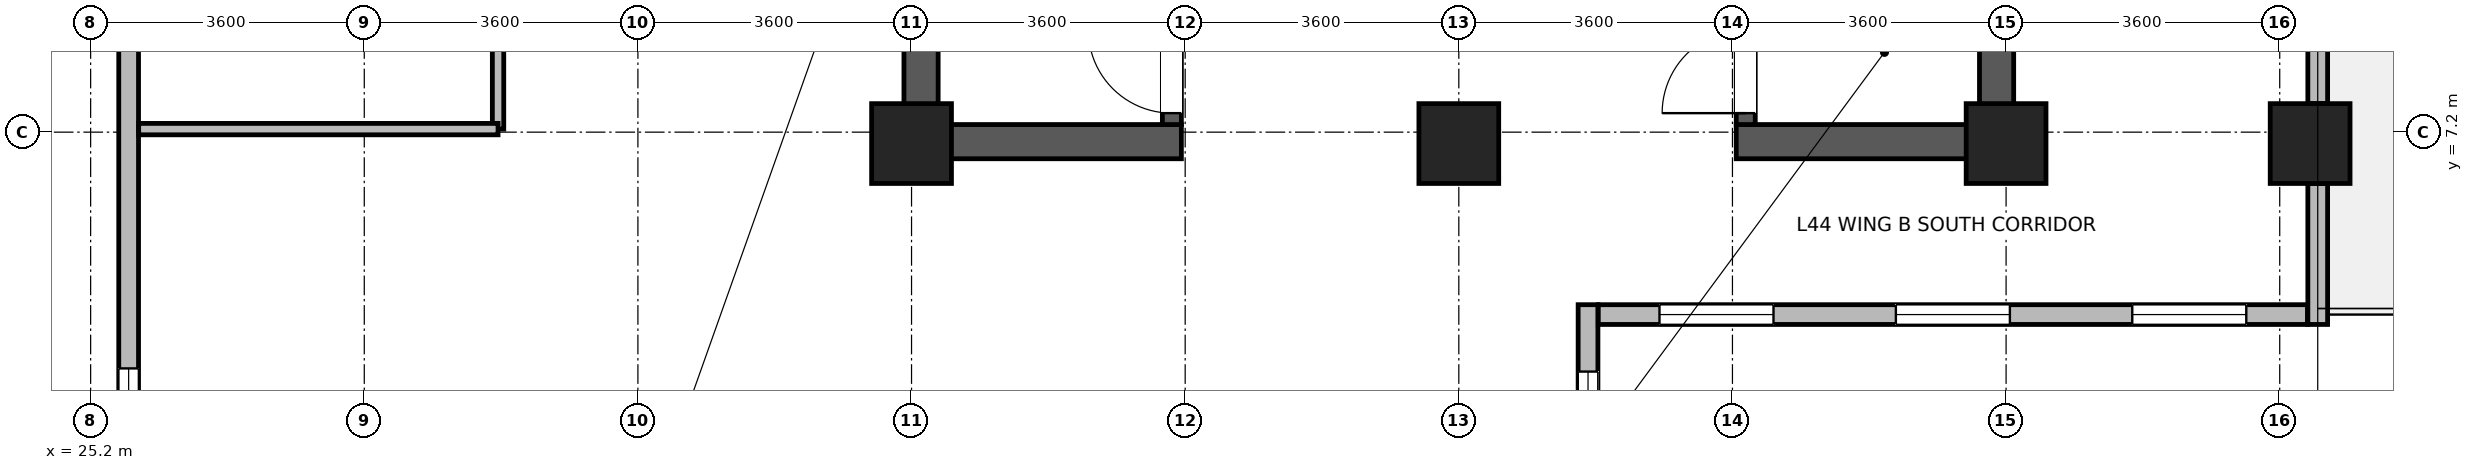
"""IFC4 building model, lengths in metres.
Left out: names, types, materials, properties, quantities, classifications, styles, units other than length and angle.
Written with IfcOpenShell. Run it as: python <this file> out.ifc"""

import sys

from ifc_helpers import new_model, si_unit, direction, frame, frame_2d, origin, origin_2d, place, context, subcontext, project, spatial, rectangle, extrude, source, transform, mapped, element, fill, save


model = new_model("IFC4")
c1 = context("Model", 3, precision=1e-05, world=origin(), true_north=direction((0.0, 1.0)))
c2 = subcontext(c1, "Body", "Model", "MODEL_VIEW")
j1 = project(units=[si_unit("LENGTHUNIT", "METRE"), si_unit("PLANEANGLEUNIT", "RADIAN")], contexts=[c1])
p1 = place(None, origin())
s1 = spatial("IfcSite", under=j1, at=p1, CompositionType="ELEMENT")
p2 = place(p1, origin())
s2 = spatial("IfcBuilding", under=s1, at=p2, CompositionType="ELEMENT")
p3 = place(p2, frame((0.0, 0.0, 173.5)))
s3 = spatial("IfcBuildingStorey", under=s2, at=p3, CompositionType="ELEMENT", Elevation=173.5)
for number, where, z_axis, x_axis in (
    (1, (36.125, 6.85, 0.0), (0.0, 0.0, 1.0), (0.0, 1.0, 0.0)),
    (2, (50.275, 6.85, 0.0), (0.0, 0.0, 1.0), (0.0, 1.0, 0.0)),
):
    element("IfcWall", number, at=place(p3, frame(where, z_axis=z_axis, x_axis=x_axis)), inside=s3, PredefinedType="SHEAR", context=c2, shape_type="SweptSolid", body=[
        extrude(rectangle(XDim=7.9, YDim=0.45, at=frame_2d((3.95, 0.0))), origin(), (0.0, 0.0, 1.0), 3.46),
    ])
for number, where, z_axis, x_axis in (
    (3, (36.35, 7.075, 0.0), (0.0, 0.0, 1.0), (1.0, 0.0, 0.0)),
    (4, (46.85, 7.075, 0.0), (0.0, 0.0, 1.0), (1.0, 0.0, 0.0)),
):
    element("IfcWall", number, at=place(p3, frame(where, z_axis=z_axis, x_axis=x_axis)), inside=s3, PredefinedType="SHEAR", context=c2, shape_type="SweptSolid", body=[
        extrude(rectangle(XDim=3.2, YDim=0.45, at=frame_2d((1.6, 0.0))), origin(), (0.0, 0.0, 1.0), 3.46),
    ])
p4 = place(p3, frame((39.425, 7.3, 0.0), z_axis=(0.0, 0.0, 1.0), x_axis=(0.0, 1.0, 0.0)))
e5 = element("IfcWall", 5, at=p4, inside=s3, PredefinedType="SHEAR", context=c2, shape_type="SweptSolid", body=[
    extrude(rectangle(XDim=7.0, YDim=0.25, at=frame_2d((3.5, 0.0))), origin(), (0.0, 0.0, 1.0), 3.46),
])
p5 = place(p4, frame((0.15, 0.0, 0.0)))
e6 = element("IfcOpeningElement", 6, at=p5, cuts=e5, PredefinedType="OPENING", context=c2, shape_type="SweptSolid", body=[
    extrude(rectangle(XDim=1.1, YDim=2.08, at=frame_2d((0.55, 1.04))), frame((0.0, 0.135, 0.0), z_axis=(0.0, -1.0, 0.0), x_axis=(1.0, 0.0, 0.0)), (0.0, 0.0, 1.0), 0.27),
])
p6 = place(p3, frame((46.975, 7.3, 0.0), z_axis=(0.0, 0.0, 1.0), x_axis=(0.0, 1.0, 0.0)))
e7 = element("IfcWall", 7, at=p6, inside=s3, PredefinedType="SHEAR", context=c2, shape_type="SweptSolid", body=[
    extrude(rectangle(XDim=7.0, YDim=0.25, at=frame_2d((3.5, 0.0))), origin(), (0.0, 0.0, 1.0), 3.46),
])
p7 = place(p6, frame((0.15, 0.0, 0.0)))
e8 = element("IfcOpeningElement", 8, at=p7, cuts=e7, PredefinedType="OPENING", context=c2, shape_type="SweptSolid", body=[
    extrude(rectangle(XDim=1.1, YDim=2.08, at=frame_2d((0.55, 1.04))), frame((0.0, 0.135, 0.0), z_axis=(0.0, -1.0, 0.0), x_axis=(1.0, 0.0, 0.0)), (0.0, 0.0, 1.0), 0.27),
])
m1 = source(origin(), c2, "Body", "SweptSolid", [
    extrude(rectangle(XDim=1.05, YDim=1.05, at=origin_2d()), origin(), (0.0, 0.0, 1.0), 3.7),
])
for number, where, z_axis, x_axis in (
    (9, (36.0, 7.05, 0.0), (0.0, 0.0, 1.0), (1.0, 0.0, 0.0)),
    (10, (43.2, 7.05, 0.0), (0.0, 0.0, 1.0), (1.0, 0.0, 0.0)),
    (11, (50.4, 7.05, 0.0), (0.0, 0.0, 1.0), (1.0, 0.0, 0.0)),
    (12, (54.4, 7.05, 0.0), (0.0, 0.0, 1.0), (1.0, 0.0, 0.0)),
):
    element("IfcColumn", number, at=place(p3, frame(where, z_axis=z_axis, x_axis=x_axis)), inside=s3, PredefinedType="COLUMN", context=c2, shape_type="MappedRepresentation", body=[
        mapped(m1, transform((0.0, 0.0, 0.0), x_axis=(1.0, 0.0, 0.0), y_axis=(0.0, 1.0, 0.0), z_axis=(0.0, 0.0, 1.0), scale=1.0)),
    ])
p8 = place(p3, frame((44.9, 4.93, 0.0), z_axis=(0.0, 0.0, 1.0), x_axis=(0.0, -1.0, 0.0)))
e13 = element("IfcWall", 13, at=p8, inside=s3, PredefinedType="STANDARD", context=c2, shape_type="SweptSolid", body=[
    extrude(rectangle(XDim=3.26, YDim=0.26, at=frame_2d((1.63, 0.0))), origin(), (0.0, 0.0, 1.0), 3.44),
])
p9 = place(p8, frame((0.88, 0.0, 0.85)))
e14 = element("IfcOpeningElement", 14, at=p9, cuts=e13, PredefinedType="OPENING", context=c2, shape_type="SweptSolid", body=[
    extrude(rectangle(XDim=1.5, YDim=1.85, at=frame_2d((0.75, 0.925))), frame((0.0, 0.14, 0.0), z_axis=(0.0, -1.0, 0.0), x_axis=(1.0, 0.0, 0.0)), (0.0, 0.0, 1.0), 0.28),
])
p10 = place(p3, frame((54.365, 4.8, 0.0), z_axis=(0.0, 0.0, 1.0), x_axis=(-1.0, 0.0, 0.0)))
e15 = element("IfcWall", 15, at=p10, inside=s3, PredefinedType="STANDARD", context=c2, shape_type="SweptSolid", body=[
    extrude(rectangle(XDim=9.33, YDim=0.26, at=frame_2d((4.665, 0.0))), origin(), (0.0, 0.0, 1.0), 3.44),
])
p11 = place(p10, frame((0.805, 0.0, 0.85)))
e16 = element("IfcOpeningElement", 16, at=p11, cuts=e15, PredefinedType="OPENING", context=c2, shape_type="SweptSolid", body=[
    extrude(rectangle(XDim=1.5, YDim=1.85, at=frame_2d((0.75, 0.925))), frame((0.0, 0.14, 0.0), z_axis=(0.0, -1.0, 0.0), x_axis=(1.0, 0.0, 0.0)), (0.0, 0.0, 1.0), 0.28),
])
p12 = place(p10, frame((3.915, 0.0, 0.85)))
e17 = element("IfcOpeningElement", 17, at=p12, cuts=e15, PredefinedType="OPENING", context=c2, shape_type="SweptSolid", body=[
    extrude(rectangle(XDim=1.5, YDim=1.85, at=frame_2d((0.75, 0.925))), frame((0.0, 0.14, 0.0), z_axis=(0.0, -1.0, 0.0), x_axis=(1.0, 0.0, 0.0)), (0.0, 0.0, 1.0), 0.28),
])
p13 = place(p10, frame((7.025, 0.0, 0.85)))
e18 = element("IfcOpeningElement", 18, at=p13, cuts=e15, PredefinedType="OPENING", context=c2, shape_type="SweptSolid", body=[
    extrude(rectangle(XDim=1.5, YDim=1.85, at=frame_2d((0.75, 0.925))), frame((0.0, 0.14, 0.0), z_axis=(0.0, -1.0, 0.0), x_axis=(1.0, 0.0, 0.0)), (0.0, 0.0, 1.0), 0.28),
])
p14 = place(p3, frame((54.5, 6.524, 0.0), z_axis=(0.0, 0.0, 1.0), x_axis=(0.0, -1.0, 0.0)))
e19 = element("IfcWall", 19, at=p14, inside=s3, PredefinedType="STANDARD", context=c2, shape_type="SweptSolid", body=[
    extrude(rectangle(XDim=1.854, YDim=0.26, at=frame_2d((0.927, 0.0))), origin(), (0.0, 0.0, 1.0), 3.44),
])
p15 = place(p3, frame((54.5, 14.024, 0.0), z_axis=(0.0, 0.0, 1.0), x_axis=(0.0, -1.0, 0.0)))
e20 = element("IfcWall", 20, at=p15, inside=s3, PredefinedType="STANDARD", context=c2, shape_type="SweptSolid", body=[
    extrude(rectangle(XDim=6.448, YDim=0.26, at=frame_2d((3.224, 0.0))), origin(), (0.0, 0.0, 1.0), 2.99),
])
p16 = place(p15, frame((4.086, 0.0, 0.85)))
e21 = element("IfcOpeningElement", 21, at=p16, cuts=e20, PredefinedType="OPENING", context=c2, shape_type="SweptSolid", body=[
    extrude(rectangle(XDim=1.5, YDim=1.85, at=frame_2d((0.75, 0.925))), frame((0.0, 0.14, 0.0), z_axis=(0.0, -1.0, 0.0), x_axis=(1.0, 0.0, 0.0)), (0.0, 0.0, 1.0), 0.28),
])
p17 = place(p15, frame((2.749, 0.0, 0.85)))
e22 = element("IfcOpeningElement", 22, at=p17, cuts=e20, PredefinedType="OPENING", context=c2, shape_type="SweptSolid", body=[
    extrude(rectangle(XDim=0.95, YDim=1.75, at=frame_2d((0.475, 0.875))), frame((0.0, 0.14, 0.0), z_axis=(0.0, -1.0, 0.0), x_axis=(1.0, 0.0, 0.0)), (0.0, 0.0, 1.0), 0.28),
])
p18 = place(p3, frame((25.7, 1.67, 0.0), z_axis=(0.0, 0.0, 1.0), x_axis=(0.0, 1.0, 0.0)))
e23 = element("IfcWall", 23, at=p18, inside=s3, PredefinedType="STANDARD", context=c2, shape_type="SweptSolid", body=[
    extrude(rectangle(XDim=20.06, YDim=0.26, at=frame_2d((10.03, 0.0))), origin(), (0.0, 0.0, 1.0), 3.44),
])
p19 = place(p18, frame((0.922, 0.0, 0.85)))
e24 = element("IfcOpeningElement", 24, at=p19, cuts=e23, PredefinedType="OPENING", context=c2, shape_type="SweptSolid", body=[
    extrude(rectangle(XDim=1.5, YDim=1.85, at=frame_2d((0.75, 0.925))), frame((0.0, 0.14, 0.0), z_axis=(0.0, -1.0, 0.0), x_axis=(1.0, 0.0, 0.0)), (0.0, 0.0, 1.0), 0.28),
])
p20 = place(p18, frame((7.608, 0.0, 0.85)))
e25 = element("IfcOpeningElement", 25, at=p20, cuts=e23, PredefinedType="OPENING", context=c2, shape_type="SweptSolid", body=[
    extrude(rectangle(XDim=1.5, YDim=1.85, at=frame_2d((0.75, 0.925))), frame((0.0, 0.14, 0.0), z_axis=(0.0, -1.0, 0.0), x_axis=(1.0, 0.0, 0.0)), (0.0, 0.0, 1.0), 0.28),
])
p21 = place(p18, frame((10.952, 0.0, 0.85)))
e26 = element("IfcOpeningElement", 26, at=p21, cuts=e23, PredefinedType="OPENING", context=c2, shape_type="SweptSolid", body=[
    extrude(rectangle(XDim=1.5, YDim=1.85, at=frame_2d((0.75, 0.925))), frame((0.0, 0.14, 0.0), z_axis=(0.0, -1.0, 0.0), x_axis=(1.0, 0.0, 0.0)), (0.0, 0.0, 1.0), 0.28),
])
p22 = place(p18, frame((14.295, 0.0, 0.85)))
e27 = element("IfcOpeningElement", 27, at=p22, cuts=e23, PredefinedType="OPENING", context=c2, shape_type="SweptSolid", body=[
    extrude(rectangle(XDim=1.5, YDim=1.85, at=frame_2d((0.75, 0.925))), frame((0.0, 0.14, 0.0), z_axis=(0.0, -1.0, 0.0), x_axis=(1.0, 0.0, 0.0)), (0.0, 0.0, 1.0), 0.28),
])
p23 = place(p18, frame((17.638, 0.0, 0.85)))
e28 = element("IfcOpeningElement", 28, at=p23, cuts=e23, PredefinedType="OPENING", context=c2, shape_type="SweptSolid", body=[
    extrude(rectangle(XDim=1.5, YDim=1.85, at=frame_2d((0.75, 0.925))), frame((0.0, 0.14, 0.0), z_axis=(0.0, -1.0, 0.0), x_axis=(1.0, 0.0, 0.0)), (0.0, 0.0, 1.0), 0.28),
])
p24 = place(p3, frame((30.56, 7.24, 0.0), z_axis=(0.0, 0.0, 1.0), x_axis=(0.0, 1.0, 0.0)))
e29 = element("IfcWall", 29, at=p24, inside=s3, PredefinedType="PARTITIONING", context=c2, shape_type="SweptSolid", body=[
    extrude(rectangle(XDim=7.26, YDim=0.15, at=frame_2d((3.63, 0.0))), origin(), (0.0, 0.0, 1.0), 3.44),
])
p25 = place(p24, frame((2.98, 0.0, 0.0)))
e30 = element("IfcOpeningElement", 30, at=p25, cuts=e29, PredefinedType="OPENING", context=c2, shape_type="SweptSolid", body=[
    extrude(rectangle(XDim=1.3, YDim=2.12, at=frame_2d((0.65, 1.06))), frame((0.0, 0.085, 0.0), z_axis=(0.0, -1.0, 0.0), x_axis=(1.0, 0.0, 0.0)), (0.0, 0.0, 1.0), 0.17),
])
p26 = place(p3, frame((25.832, 7.24, 0.0), z_axis=(0.0, 0.0, 1.0), x_axis=(1.0, 0.0, 0.0)))
e31 = element("IfcWall", 31, at=p26, inside=s3, PredefinedType="PARTITIONING", context=c2, shape_type="SweptSolid", body=[
    extrude(rectangle(XDim=4.728, YDim=0.15, at=frame_2d((2.364, 0.0))), origin(), (0.0, 0.0, 1.0), 3.44),
])
p27 = place(p9, origin())
e32 = element("IfcWindow", 32, at=p27, inside=s3, PartitioningType="SINGLE_PANEL", PredefinedType="WINDOW", context=c2, shape_type="SweptSolid", body=[
    extrude(rectangle(XDim=1.5, YDim=1.85, at=frame_2d((0.75, 0.925))), frame((0.0, 0.03, 0.0), z_axis=(0.0, -1.0, 0.0), x_axis=(1.0, 0.0, 0.0)), (0.0, 0.0, 1.0), 0.06),
])
fill(e14, e32)
p28 = place(p11, origin())
e33 = element("IfcWindow", 33, at=p28, inside=s3, PartitioningType="SINGLE_PANEL", PredefinedType="WINDOW", context=c2, shape_type="SweptSolid", body=[
    extrude(rectangle(XDim=1.5, YDim=1.85, at=frame_2d((0.75, 0.925))), frame((0.0, 0.03, 0.0), z_axis=(0.0, -1.0, 0.0), x_axis=(1.0, 0.0, 0.0)), (0.0, 0.0, 1.0), 0.06),
])
fill(e16, e33)
p29 = place(p12, origin())
e34 = element("IfcWindow", 34, at=p29, inside=s3, PartitioningType="SINGLE_PANEL", PredefinedType="WINDOW", context=c2, shape_type="SweptSolid", body=[
    extrude(rectangle(XDim=1.5, YDim=1.85, at=frame_2d((0.75, 0.925))), frame((0.0, 0.03, 0.0), z_axis=(0.0, -1.0, 0.0), x_axis=(1.0, 0.0, 0.0)), (0.0, 0.0, 1.0), 0.06),
])
fill(e17, e34)
p30 = place(p13, origin())
e35 = element("IfcWindow", 35, at=p30, inside=s3, PartitioningType="SINGLE_PANEL", PredefinedType="WINDOW", context=c2, shape_type="SweptSolid", body=[
    extrude(rectangle(XDim=1.5, YDim=1.85, at=frame_2d((0.75, 0.925))), frame((0.0, 0.03, 0.0), z_axis=(0.0, -1.0, 0.0), x_axis=(1.0, 0.0, 0.0)), (0.0, 0.0, 1.0), 0.06),
])
fill(e18, e35)
p31 = place(p19, origin())
e36 = element("IfcWindow", 36, at=p31, inside=s3, PartitioningType="SINGLE_PANEL", PredefinedType="WINDOW", context=c2, shape_type="SweptSolid", body=[
    extrude(rectangle(XDim=1.5, YDim=1.85, at=frame_2d((0.75, 0.925))), frame((0.0, 0.03, 0.0), z_axis=(0.0, -1.0, 0.0), x_axis=(1.0, 0.0, 0.0)), (0.0, 0.0, 1.0), 0.06),
])
fill(e24, e36)
p32 = place(p5, origin())
e37 = element("IfcDoor", 37, at=p32, inside=s3, OperationType="SINGLE_SWING_RIGHT", PredefinedType="DOOR", context=c2, shape_type="SweptSolid", body=[
    extrude(rectangle(XDim=1.1, YDim=2.08, at=frame_2d((0.55, 1.04))), frame((0.0, 0.025, 0.0), z_axis=(0.0, -1.0, 0.0), x_axis=(1.0, 0.0, 0.0)), (0.0, 0.0, 1.0), 0.05),
])
fill(e6, e37)
p33 = place(p7, origin())
e38 = element("IfcDoor", 38, at=p33, inside=s3, OperationType="SINGLE_SWING_LEFT", PredefinedType="DOOR", context=c2, shape_type="SweptSolid", body=[
    extrude(rectangle(XDim=1.1, YDim=2.08, at=frame_2d((0.55, 1.04))), frame((0.0, 0.025, 0.0), z_axis=(0.0, -1.0, 0.0), x_axis=(1.0, 0.0, 0.0)), (0.0, 0.0, 1.0), 0.05),
])
fill(e8, e38)
save(model, sys.argv[1])
